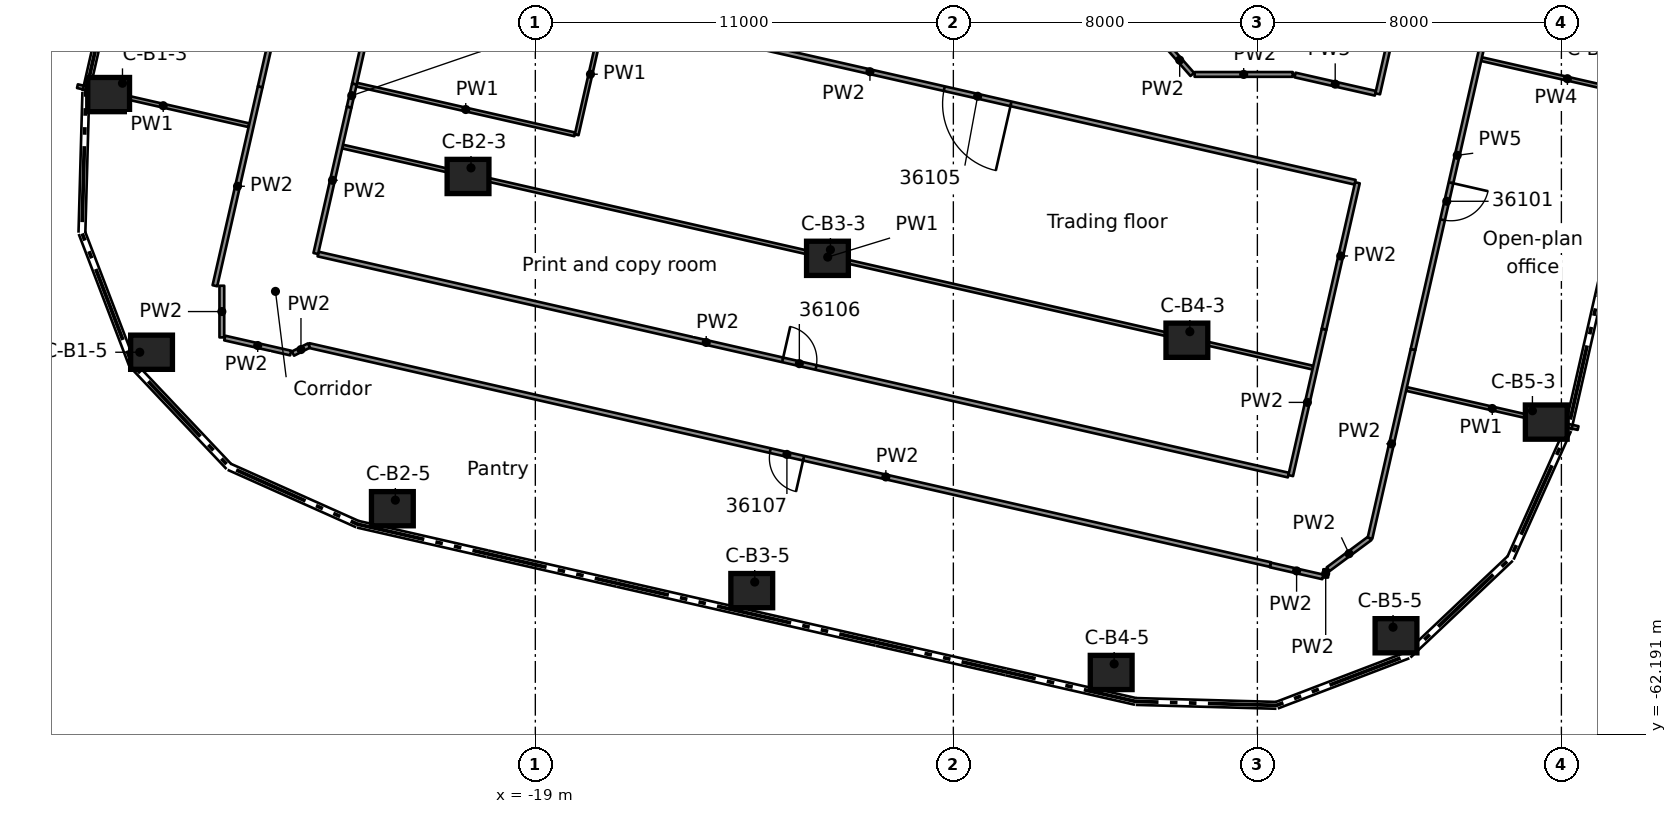
"""IFC4 building model, lengths in metres.
Left out: names, types, materials, properties, quantities, classifications, styles, units other than length and angle.
Written with IfcOpenShell. Run it as: python <this file> out.ifc"""

import sys

from ifc_helpers import new_model, si_unit, direction, frame, frame_2d, origin, origin_2d, place, context, subcontext, project, spatial, rectangle, extrude, element, fill, save


model = new_model("IFC4")
c1 = context("Model", 3, precision=1e-05, world=origin(), true_north=direction((0.0, 1.0)))
c2 = subcontext(c1, "Body", "Model", "MODEL_VIEW")
j1 = project(units=[si_unit("LENGTHUNIT", "METRE"), si_unit("PLANEANGLEUNIT", "RADIAN")], contexts=[c1])
p1 = place(None, origin())
s1 = spatial("IfcSite", under=j1, at=p1, CompositionType="ELEMENT")
p2 = place(p1, origin())
s2 = spatial("IfcBuilding", under=s1, at=p2, CompositionType="ELEMENT")
p3 = place(p2, frame((0.0, 0.0, 181.1)))
s3 = spatial("IfcBuildingStorey", under=s2, at=p3, CompositionType="ELEMENT", Elevation=181.1)
for number, where, z_axis, x_axis in (
    (1, (-30.228, -45.352, 0.0), (0.0, 0.0, 1.0), (1.0, 0.0, 0.0)),
    (2, (-29.099, -52.132, 0.0), (0.0, 0.0, 1.0), (1.0, 0.0, 0.0)),
    (3, (-20.771, -47.507, 0.0), (0.0, 0.0, 1.0), (1.0, 0.0, 0.0)),
    (4, (-22.762, -56.249, 0.0), (0.0, 0.0, 1.0), (1.0, 0.0, 0.0)),
    (5, (-11.313, -49.661, 0.0), (0.0, 0.0, 1.0), (1.0, 0.0, 0.0)),
    (6, (-13.305, -58.404, 0.0), (0.0, 0.0, 1.0), (1.0, 0.0, 0.0)),
    (7, (-1.855, -51.816, 0.0), (0.0, 0.0, 1.0), (1.0, 0.0, 0.0)),
    (8, (-3.847, -60.558, 0.0), (0.0, 0.0, 1.0), (1.0, 0.0, 0.0)),
    (9, (7.602, -53.97, 0.0), (0.0, 0.0, 1.0), (1.0, 0.0, 0.0)),
    (10, (3.648, -59.592, 0.0), (0.0, 0.0, 1.0), (1.0, 0.0, 0.0)),
):
    element("IfcColumn", number, at=place(p3, frame(where, z_axis=z_axis, x_axis=x_axis)), inside=s3, PredefinedType="COLUMN", context=c2, shape_type="SweptSolid", body=[
        extrude(rectangle(XDim=1.1, YDim=0.9, at=origin_2d()), origin(), (0.0, 0.0, 1.0), 3.5),
    ])
p4 = place(p3, frame((-27.173, -51.758, 0.0), z_axis=(0.0, 0.0, 1.0), x_axis=(0.975050579035, -0.221982810874, 0.0)))
e11 = element("IfcWall", 11, at=p4, inside=s3, PredefinedType="PARTITIONING", context=c2, shape_type="SweptSolid", body=[
    extrude(rectangle(XDim=1.78, YDim=0.125, at=frame_2d((0.89, 0.0))), origin(), (0.0, 0.0, 1.0), 3.06),
])
p5 = place(p3, frame((0.342, -57.729, 0.0), z_axis=(0.0, 0.0, 1.0), x_axis=(0.975078596589, -0.22185970899, 0.0)))
e12 = element("IfcWall", 12, at=p5, inside=s3, PredefinedType="PARTITIONING", context=c2, shape_type="SweptSolid", body=[
    extrude(rectangle(XDim=1.415, YDim=0.125, at=frame_2d((0.708, 0.0))), origin(), (0.0, 0.0, 1.0), 3.06),
])
p6 = place(p3, frame((0.344, -57.719, 0.0), z_axis=(0.0, 0.0, 1.0), x_axis=(-0.97501877272, 0.222122472621, 0.0)))
e13 = element("IfcWall", 13, at=p6, inside=s3, PredefinedType="PARTITIONING", context=c2, shape_type="SweptSolid", body=[
    extrude(rectangle(XDim=25.949, YDim=0.125, at=frame_2d((12.975, 0.0))), origin(), (0.0, 0.0, 1.0), 3.06),
])
p7 = place(p6, frame((12.6, 0.0, 0.0)))
e14 = element("IfcOpeningElement", 14, at=p7, cuts=e13, PredefinedType="OPENING", context=c2, shape_type="SweptSolid", body=[
    extrude(rectangle(XDim=0.9, YDim=2.1, at=frame_2d((0.45, 1.05))), frame((0.0, 0.073, 0.0), z_axis=(0.0, -1.0, 0.0), x_axis=(1.0, 0.0, 0.0)), (0.0, 0.0, 1.0), 0.145),
])
p8 = place(p3, frame((-24.716, -49.548, 0.0), z_axis=(0.0, 0.0, 1.0), x_axis=(0.975023843859, -0.222100211404, 0.0)))
e15 = element("IfcWall", 15, at=p8, inside=s3, PredefinedType="PARTITIONING", context=c2, shape_type="SweptSolid", body=[
    extrude(rectangle(XDim=26.186, YDim=0.125, at=frame_2d((13.093, 0.0))), origin(), (0.0, 0.0, 1.0), 3.06),
])
p9 = place(p8, frame((12.538, 0.0, 0.0)))
e16 = element("IfcOpeningElement", 16, at=p9, cuts=e15, PredefinedType="OPENING", context=c2, shape_type="SweptSolid", body=[
    extrude(rectangle(XDim=0.9, YDim=2.1, at=frame_2d((0.45, 1.05))), frame((0.0, 0.073, 0.0), z_axis=(0.0, -1.0, 0.0), x_axis=(1.0, 0.0, 0.0)), (0.0, 0.0, 1.0), 0.145),
])
p10 = place(p3, frame((-31.049, -45.131, 0.0), z_axis=(0.0, 0.0, 1.0), x_axis=(0.975044716765, -0.22200855909, 0.0)))
e17 = element("IfcWall", 17, at=p10, inside=s3, PredefinedType="PARTITIONING", context=c2, shape_type="SweptSolid", body=[
    extrude(rectangle(XDim=4.63, YDim=0.1, at=frame_2d((2.315, 0.0))), origin(), (0.0, 0.0, 1.0), 3.06),
])
p11 = place(p3, frame((-24.072, -46.72, 0.0), z_axis=(0.0, 0.0, 1.0), x_axis=(0.975013747988, -0.222144527805, 0.0)))
e18 = element("IfcWall", 18, at=p11, inside=s3, PredefinedType="PARTITIONING", context=c2, shape_type="SweptSolid", body=[
    extrude(rectangle(XDim=26.186, YDim=0.1, at=frame_2d((13.093, 0.0))), origin(), (0.0, 0.0, 1.0), 3.06),
])
p12 = place(p3, frame((3.923, -53.098, 0.0), z_axis=(0.0, 0.0, 1.0), x_axis=(0.975005836175, -0.222179250661, 0.0)))
e19 = element("IfcWall", 19, at=p12, inside=s3, PredefinedType="PARTITIONING", context=c2, shape_type="SweptSolid", body=[
    extrude(rectangle(XDim=4.632, YDim=0.1, at=frame_2d((2.316, 0.0))), origin(), (0.0, 0.0, 1.0), 3.06),
])
p13 = place(p3, frame((-23.701, -45.092, 0.0), z_axis=(0.0, 0.0, 1.0), x_axis=(0.9750468239, -0.22199930451, 0.0)))
e20 = element("IfcWall", 20, at=p13, inside=s3, PredefinedType="PARTITIONING", context=c2, shape_type="SweptSolid", body=[
    extrude(rectangle(XDim=5.887, YDim=0.1, at=frame_2d((2.943, 0.0))), origin(), (0.0, 0.0, 1.0), 3.06),
])
p14 = place(p3, frame((2.571, -47.659, 0.0), z_axis=(0.0, 0.0, 1.0), x_axis=(-0.975023843859, 0.222100211404, 0.0)))
e21 = element("IfcWall", 21, at=p14, inside=s3, PredefinedType="PARTITIONING", context=c2, shape_type="SweptSolid", body=[
    extrude(rectangle(XDim=26.186, YDim=0.125, at=frame_2d((13.093, 0.0))), origin(), (0.0, 0.0, 1.0), 3.06),
])
p15 = place(p14, frame((9.287, 0.0, 0.0)))
e22 = element("IfcOpeningElement", 22, at=p15, cuts=e21, PredefinedType="OPENING", context=c2, shape_type="SweptSolid", body=[
    extrude(rectangle(XDim=1.8, YDim=2.1, at=frame_2d((0.9, 1.05))), frame((0.0, 0.073, 0.0), z_axis=(0.0, -1.0, 0.0), x_axis=(1.0, 0.0, 0.0)), (0.0, 0.0, 1.0), 0.145),
])
p16 = place(p3, frame((0.991, -44.837, 0.0), z_axis=(0.0, 0.0, 1.0), x_axis=(0.97505868901, -0.22194718513, 0.0)))
e23 = element("IfcWall", 23, at=p16, inside=s3, PredefinedType="PARTITIONING", context=c2, shape_type="SweptSolid", body=[
    extrude(rectangle(XDim=2.168, YDim=0.125, at=frame_2d((1.084, 0.0))), origin(), (0.0, 0.0, 1.0), 2.425),
])
p17 = place(p3, frame((5.9, -44.42, 0.0), z_axis=(0.0, 0.0, 1.0), x_axis=(0.975008438008, -0.222167832534, 0.0)))
e24 = element("IfcWall", 24, at=p17, inside=s3, PredefinedType="PARTITIONING", context=c2, shape_type="SweptSolid", body=[
    extrude(rectangle(XDim=4.632, YDim=0.1, at=frame_2d((2.316, 0.0))), origin(), (0.0, 0.0, 1.0), 2.425),
])
p18 = place(p3, frame((1.861, -57.842, 0.0), z_axis=(0.0, 0.0, 1.0), x_axis=(0.803188576955, 0.595724860862, 0.0)))
e25 = element("IfcWall", 25, at=p18, inside=s3, PredefinedType="PARTITIONING", context=c2, shape_type="SweptSolid", body=[
    extrude(rectangle(XDim=1.373, YDim=0.125, at=frame_2d((0.687, 0.0))), origin(), (0.0, 0.0, 1.0), 3.06),
])
p19 = place(p3, frame((-1.651, -44.822, 0.0), z_axis=(0.0, 0.0, 1.0), x_axis=(1.0, 0.0, 0.0)))
e26 = element("IfcWall", 26, at=p19, inside=s3, PredefinedType="PARTITIONING", context=c2, shape_type="SweptSolid", body=[
    extrude(rectangle(XDim=2.581, YDim=0.125, at=frame_2d((1.291, 0.0))), origin(), (0.0, 0.0, 1.0), 3.06),
])
p20 = place(p3, frame((4.096, -52.059, 0.0), z_axis=(0.0, 0.0, 1.0), x_axis=(-0.222267590123, -0.974985701629, 0.0)))
e27 = element("IfcWall", 27, at=p20, inside=s3, PredefinedType="PARTITIONING", context=c2, shape_type="SweptSolid", body=[
    extrude(rectangle(XDim=5.092, YDim=0.125, at=frame_2d((2.546, 0.0))), origin(), (0.0, 0.0, 1.0), 3.06),
])
p21 = place(p3, frame((-25.377, -52.167, 0.0), z_axis=(0.0, 0.0, 1.0), x_axis=(0.892760073249, 0.450532409058, 0.0)))
e28 = element("IfcWall", 28, at=p21, inside=s3, PredefinedType="PARTITIONING", context=c2, shape_type="SweptSolid", body=[
    extrude(rectangle(XDim=0.47, YDim=0.125, at=frame_2d((0.235, 0.0))), origin(), (0.0, 0.0, 1.0), 3.06),
])
p22 = place(p3, frame((-23.899, -45.681, 0.0), z_axis=(0.0, 0.0, 1.0), x_axis=(-0.222219189768, -0.974996734199, 0.0)))
e29 = element("IfcWall", 29, at=p22, inside=s3, PredefinedType="PARTITIONING", context=c2, shape_type="SweptSolid", body=[
    extrude(rectangle(XDim=3.952, YDim=0.125, at=frame_2d((1.976, 0.0))), origin(), (0.0, 0.0, 1.0), 3.06),
])
p23 = place(p3, frame((-26.24, -45.148, 0.0), z_axis=(0.0, 0.0, 1.0), x_axis=(-0.222031920234, -0.975039397356, 0.0)))
e30 = element("IfcWall", 30, at=p23, inside=s3, PredefinedType="PARTITIONING", context=c2, shape_type="SweptSolid", body=[
    extrude(rectangle(XDim=5.368, YDim=0.125, at=frame_2d((2.684, 0.0))), origin(), (0.0, 0.0, 1.0), 3.06),
])
p24 = place(p3, frame((6.423, -41.842, 0.0), z_axis=(0.0, 0.0, 1.0), x_axis=(-0.222083299456, -0.97502769607, 0.0)))
e31 = element("IfcWall", 31, at=p24, inside=s3, PredefinedType="PARTITIONING", context=c2, shape_type="SweptSolid", body=[
    extrude(rectangle(XDim=10.479, YDim=0.125, at=frame_2d((5.239, 0.0))), origin(), (0.0, 0.0, 1.0), 2.425),
])
p25 = place(p24, frame((5.98, 0.0, 0.0)))
e32 = element("IfcOpeningElement", 32, at=p25, cuts=e31, PredefinedType="OPENING", context=c2, shape_type="SweptSolid", body=[
    extrude(rectangle(XDim=1.0, YDim=2.1, at=frame_2d((0.5, 1.05))), frame((0.0, 0.073, 0.0), z_axis=(0.0, -1.0, 0.0), x_axis=(1.0, 0.0, 0.0)), (0.0, 0.0, 1.0), 0.145),
])
p26 = place(p3, frame((1.755, -51.525, 0.0), z_axis=(0.0, 0.0, 1.0), x_axis=(-0.222160460256, -0.975010117844, 0.0)))
e33 = element("IfcWall", 33, at=p26, inside=s3, PredefinedType="PARTITIONING", context=c2, shape_type="SweptSolid", body=[
    extrude(rectangle(XDim=3.952, YDim=0.125, at=frame_2d((1.976, 0.0))), origin(), (0.0, 0.0, 1.0), 3.06),
])
p27 = place(p3, frame((1.755, -51.525, 0.0), z_axis=(0.0, 0.0, 1.0), x_axis=(0.222286135557, 0.974981473639, 0.0)))
e34 = element("IfcWall", 34, at=p27, inside=s3, PredefinedType="PARTITIONING", context=c2, shape_type="SweptSolid", body=[
    extrude(rectangle(XDim=3.951, YDim=0.125, at=frame_2d((1.975, 0.0))), origin(), (0.0, 0.0, 1.0), 3.06),
])
p28 = place(p3, frame((3.166, -45.332, 0.0), z_axis=(0.0, 0.0, 1.0), x_axis=(0.221843071865, 0.975082381887, 0.0)))
e35 = element("IfcWall", 35, at=p28, inside=s3, PredefinedType="PARTITIONING", context=c2, shape_type="SweptSolid", body=[
    extrude(rectangle(XDim=10.886, YDim=0.125, at=frame_2d((5.443, 0.0))), origin(), (0.0, 0.0, 1.0), 2.425),
])
p29 = place(p3, frame((-17.912, -46.41, 0.0), z_axis=(0.0, 0.0, 1.0), x_axis=(0.222131144085, 0.975016797203, 0.0)))
e36 = element("IfcWall", 36, at=p29, inside=s3, PredefinedType="PARTITIONING", context=c2, shape_type="SweptSolid", body=[
    extrude(rectangle(XDim=3.269, YDim=0.1, at=frame_2d((1.634, 0.0))), origin(), (0.0, 0.0, 1.0), 3.06),
])
p30 = place(p3, frame((-23.022, -41.829, 0.0), z_axis=(0.0, 0.0, 1.0), x_axis=(-0.222150102986, -0.975012477737, 0.0)))
e37 = element("IfcWall", 37, at=p30, inside=s3, PredefinedType="PARTITIONING", context=c2, shape_type="SweptSolid", body=[
    extrude(rectangle(XDim=3.331, YDim=0.125, at=frame_2d((1.666, 0.0))), origin(), (0.0, 0.0, 1.0), 3.06),
])
p31 = place(p30, frame((1.1, 0.0, 0.0)))
e38 = element("IfcOpeningElement", 38, at=p31, cuts=e37, PredefinedType="OPENING", context=c2, shape_type="SweptSolid", body=[
    extrude(rectangle(XDim=1.1, YDim=2.1, at=frame_2d((0.55, 1.05))), frame((0.0, 0.073, 0.0), z_axis=(0.0, -1.0, 0.0), x_axis=(1.0, 0.0, 0.0)), (0.0, 0.0, 1.0), 0.145),
])
p32 = place(p3, frame((-23.899, -45.681, 0.0), z_axis=(0.0, 0.0, 1.0), x_axis=(0.221484587938, 0.975163872027, 0.0)))
e39 = element("IfcWall", 39, at=p32, inside=s3, PredefinedType="PARTITIONING", context=c2, shape_type="SweptSolid", body=[
    extrude(rectangle(XDim=0.618, YDim=0.125, at=frame_2d((0.309, 0.0))), origin(), (0.0, 0.0, 1.0), 3.06),
])
p33 = place(p3, frame((-26.24, -45.148, 0.0), z_axis=(0.0, 0.0, 1.0), x_axis=(0.22206165199, 0.975032626488, 0.0)))
e40 = element("IfcWall", 40, at=p33, inside=s3, PredefinedType="PARTITIONING", context=c2, shape_type="SweptSolid", body=[
    extrude(rectangle(XDim=11.042, YDim=0.125, at=frame_2d((5.521, 0.0))), origin(), (0.0, 0.0, 1.0), 3.06),
])
p34 = place(p33, frame((8.949, 0.0, 0.0)))
e41 = element("IfcOpeningElement", 41, at=p34, cuts=e40, PredefinedType="OPENING", context=c2, shape_type="SweptSolid", body=[
    extrude(rectangle(XDim=0.9, YDim=2.1, at=frame_2d((0.45, 1.05))), frame((0.0, 0.073, 0.0), z_axis=(0.0, -1.0, 0.0), x_axis=(1.0, 0.0, 0.0)), (0.0, 0.0, 1.0), 0.145),
])
p35 = place(p33, frame((3.1, 0.0, 0.0)))
e42 = element("IfcOpeningElement", 42, at=p35, cuts=e40, PredefinedType="OPENING", context=c2, shape_type="SweptSolid", body=[
    extrude(rectangle(XDim=1.8, YDim=2.1, at=frame_2d((0.9, 1.05))), frame((0.0, 0.073, 0.0), z_axis=(0.0, -1.0, 0.0), x_axis=(1.0, 0.0, 0.0)), (0.0, 0.0, 1.0), 0.145),
])
p36 = place(p3, frame((1.798, -58.06, 0.0), z_axis=(0.0, 0.0, 1.0), x_axis=(0.0, 1.0, 0.0)))
e43 = element("IfcWall", 43, at=p36, inside=s3, PredefinedType="PARTITIONING", context=c2, shape_type="SweptSolid", body=[
    extrude(rectangle(XDim=0.218, YDim=0.125, at=frame_2d((0.109, 0.0))), origin(), (0.0, 0.0, 1.0), 3.06),
])
p37 = place(p3, frame((-1.713, -44.822, 0.0), z_axis=(0.0, 0.0, 1.0), x_axis=(-0.660913097692, 0.750462442298, 0.0)))
e44 = element("IfcWall", 44, at=p37, inside=s3, PredefinedType="PARTITIONING", context=c2, shape_type="SweptSolid", body=[
    extrude(rectangle(XDim=1.003, YDim=0.125, at=frame_2d((0.501, 0.0))), origin(), (0.0, 0.0, 1.0), 3.06),
])
p38 = place(p3, frame((-27.249, -51.741, 0.0), z_axis=(0.0, 0.0, 1.0), x_axis=(0.0, 1.0, 0.0)))
e45 = element("IfcWall", 45, at=p38, inside=s3, PredefinedType="PARTITIONING", context=c2, shape_type="SweptSolid", body=[
    extrude(rectangle(XDim=1.359, YDim=0.125, at=frame_2d((0.679, 0.0))), origin(), (0.0, 0.0, 1.0), 3.06),
])
p39 = place(p25, origin())
e46 = element("IfcDoor", 46, at=p39, inside=s3, OperationType="SINGLE_SWING_RIGHT", PredefinedType="DOOR", context=c2, shape_type="SweptSolid", body=[
    extrude(rectangle(XDim=1.0, YDim=2.1, at=frame_2d((0.5, 1.05))), frame((0.0, 0.025, 0.0), z_axis=(0.0, -1.0, 0.0), x_axis=(1.0, 0.0, 0.0)), (0.0, 0.0, 1.0), 0.05),
])
fill(e32, e46)
p40 = place(p15, origin())
e47 = element("IfcDoor", 47, at=p40, inside=s3, OperationType="DOUBLE_DOOR_SINGLE_SWING", PredefinedType="DOOR", context=c2, shape_type="SweptSolid", body=[
    extrude(rectangle(XDim=1.8, YDim=2.1, at=frame_2d((0.9, 1.05))), frame((0.0, 0.025, 0.0), z_axis=(0.0, -1.0, 0.0), x_axis=(1.0, 0.0, 0.0)), (0.0, 0.0, 1.0), 0.05),
])
fill(e22, e47)
p41 = place(p9, origin())
e48 = element("IfcDoor", 48, at=p41, inside=s3, OperationType="SINGLE_SWING_LEFT", PredefinedType="DOOR", context=c2, shape_type="SweptSolid", body=[
    extrude(rectangle(XDim=0.9, YDim=2.1, at=frame_2d((0.45, 1.05))), frame((0.0, 0.025, 0.0), z_axis=(0.0, -1.0, 0.0), x_axis=(1.0, 0.0, 0.0)), (0.0, 0.0, 1.0), 0.05),
])
fill(e16, e48)
p42 = place(p7, origin())
e49 = element("IfcDoor", 49, at=p42, inside=s3, OperationType="SINGLE_SWING_RIGHT", PredefinedType="DOOR", context=c2, shape_type="SweptSolid", body=[
    extrude(rectangle(XDim=0.9, YDim=2.1, at=frame_2d((0.45, 1.05))), frame((0.0, 0.025, 0.0), z_axis=(0.0, -1.0, 0.0), x_axis=(1.0, 0.0, 0.0)), (0.0, 0.0, 1.0), 0.05),
])
fill(e14, e49)
save(model, sys.argv[1])
